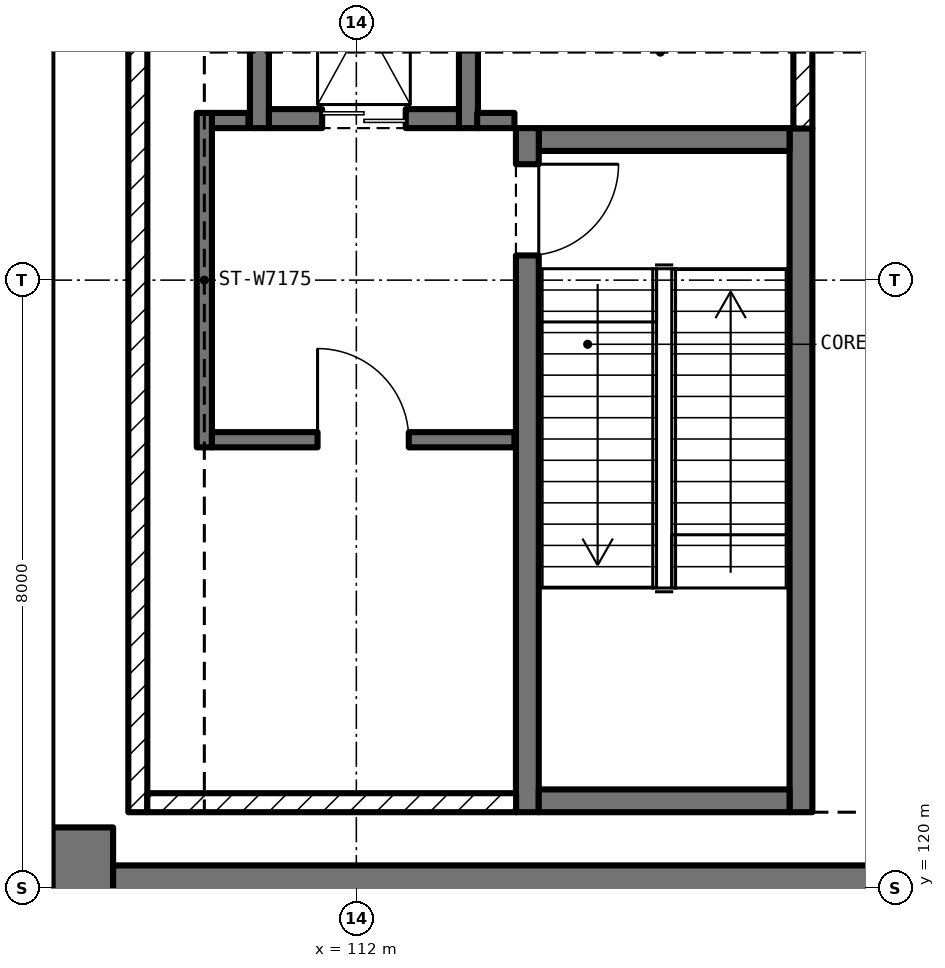
"""IFC4 building model, lengths in metres.
Left out: names, types, materials, properties, quantities, classifications, styles, units other than length and angle.
Written with IfcOpenShell. Run it as: python <this file> out.ifc"""

import sys

from ifc_helpers import new_model, si_unit, direction, frame, frame_2d, origin, place, context, subcontext, project, spatial, rectangle, extrude, element, fill, save


model = new_model("IFC4")
c1 = context("Model", 3, precision=1e-05, world=origin(), true_north=direction((0.0, 1.0)))
c2 = subcontext(c1, "Body", "Model", "MODEL_VIEW")
j1 = project(units=[si_unit("LENGTHUNIT", "METRE"), si_unit("PLANEANGLEUNIT", "RADIAN")], contexts=[c1])
p1 = place(None, origin())
s1 = spatial("IfcSite", under=j1, at=p1, CompositionType="ELEMENT")
p2 = place(p1, origin())
s2 = spatial("IfcBuilding", under=s1, at=p2, CompositionType="ELEMENT")
p3 = place(p2, frame((0.0, 0.0, 6.0)))
s3 = spatial("IfcBuildingStorey", under=s2, at=p3, CompositionType="ELEMENT", Elevation=6.0)
p4 = place(p3, frame((108.4, 116.0, 0.0), z_axis=(0.0, 0.0, 1.0), x_axis=(0.0, 1.0, 0.0)))
e1 = element("IfcWall", 1, at=p4, inside=s3, PredefinedType="SHEAR", context=c2, shape_type="SweptSolid", body=[
    extrude(rectangle(XDim=4.8, YDim=0.8, at=frame_2d((2.4, 0.0))), origin(), (0.0, 0.0, 1.0), 5.5),
])
p5 = place(p3, frame((108.8, 120.0, 0.0), z_axis=(0.0, 0.0, 1.0), x_axis=(1.0, 0.0, 0.0)))
e2 = element("IfcWall", 2, at=p5, inside=s3, PredefinedType="SHEAR", context=c2, shape_type="SweptSolid", body=[
    extrude(rectangle(XDim=22.6, YDim=0.6, at=frame_2d((11.3, 0.0))), origin(), (0.0, 0.0, 1.0), 5.5),
])
p6 = place(p3, frame((117.85, 121.0, 0.0), z_axis=(0.0, 0.0, 1.0), x_axis=(0.0, 1.0, 0.0)))
e3 = element("IfcWall", 3, at=p6, inside=s3, PredefinedType="SOLIDWALL", context=c2, shape_type="SweptSolid", body=[
    extrude(rectangle(XDim=9.0, YDim=0.3, at=frame_2d((4.5, 0.0))), origin(), (0.0, 0.0, 1.0), 5.5),
])
p7 = place(p3, frame((117.7, 129.85, 0.0), z_axis=(0.0, 0.0, 1.0), x_axis=(-1.0, 0.0, 0.0)))
e4 = element("IfcWall", 4, at=p7, inside=s3, PredefinedType="SOLIDWALL", context=c2, shape_type="SweptSolid", body=[
    extrude(rectangle(XDim=3.3, YDim=0.3, at=frame_2d((1.65, 0.0))), origin(), (0.0, 0.0, 1.0), 5.5),
])
p8 = place(p3, frame((114.25, 130.0, 0.0), z_axis=(0.0, 0.0, 1.0), x_axis=(0.0, -1.0, 0.0)))
e5 = element("IfcWall", 5, at=p8, inside=s3, PredefinedType="SOLIDWALL", context=c2, shape_type="SweptSolid", body=[
    extrude(rectangle(XDim=9.0, YDim=0.3, at=frame_2d((4.5, 0.0))), origin(), (0.0, 0.0, 1.0), 5.5),
])
p9 = place(p8, frame((0.475, 0.0, 0.0)))
e6 = element("IfcOpeningElement", 6, at=p9, cuts=e5, PredefinedType="OPENING", context=c2, shape_type="SweptSolid", body=[
    extrude(rectangle(XDim=1.2, YDim=2.1, at=frame_2d((0.6, 1.05))), frame((0.0, 0.162, 0.0), z_axis=(0.0, -1.0, 0.0), x_axis=(1.0, 0.0, 0.0)), (0.0, 0.0, 1.0), 0.324),
])
p10 = place(p3, frame((114.4, 121.15, 0.0), z_axis=(0.0, 0.0, 1.0), x_axis=(1.0, 0.0, 0.0)))
e7 = element("IfcWall", 7, at=p10, inside=s3, PredefinedType="SOLIDWALL", context=c2, shape_type="SweptSolid", body=[
    extrude(rectangle(XDim=3.3, YDim=0.3, at=frame_2d((1.65, 0.0))), origin(), (0.0, 0.0, 1.0), 5.5),
])
for number, where, z_axis, x_axis in (
    (8, (113.475, 130.0, 0.0), (0.0, 0.0, 1.0), (0.0, 1.0, 0.0)),
    (9, (110.725, 134.0, 0.0), (0.0, 0.0, 1.0), (0.0, -1.0, 0.0)),
):
    element("IfcWall", number, at=place(p3, frame(where, z_axis=z_axis, x_axis=x_axis)), inside=s3, PredefinedType="SOLIDWALL", context=c2, shape_type="SweptSolid", body=[
        extrude(rectangle(XDim=4.0, YDim=0.25, at=frame_2d((2.0, 0.0))), origin(), (0.0, 0.0, 1.0), 5.5),
    ])
p11 = place(p3, frame((110.85, 130.125, 0.0), z_axis=(0.0, 0.0, 1.0), x_axis=(1.0, 0.0, 0.0)))
e10 = element("IfcWall", 10, at=p11, inside=s3, PredefinedType="SOLIDWALL", context=c2, shape_type="SweptSolid", body=[
    extrude(rectangle(XDim=2.5, YDim=0.25, at=frame_2d((1.25, 0.0))), origin(), (0.0, 0.0, 1.0), 5.5),
])
p12 = place(p11, frame((0.7, 0.0, 0.0)))
e11 = element("IfcOpeningElement", 11, at=p12, cuts=e10, PredefinedType="OPENING", context=c2, shape_type="SweptSolid", body=[
    extrude(rectangle(XDim=1.1, YDim=2.1, at=frame_2d((0.55, 1.05))), frame((0.0, 0.137, 0.0), z_axis=(0.0, -1.0, 0.0), x_axis=(1.0, 0.0, 0.0)), (0.0, 0.0, 1.0), 0.274),
])
p13 = place(p3, frame((114.08, 130.1, 0.0), z_axis=(0.0, 0.0, 1.0), x_axis=(-1.0, 0.0, 0.0)))
e12 = element("IfcWall", 12, at=p13, inside=s3, PredefinedType="PARTITIONING", context=c2, shape_type="SweptSolid", body=[
    extrude(rectangle(XDim=0.49, YDim=0.2, at=frame_2d((0.245, 0.0))), origin(), (0.0, 0.0, 1.0), 5.28),
])
p14 = place(p3, frame((110.58, 130.1, 0.0), z_axis=(0.0, 0.0, 1.0), x_axis=(-1.0, 0.0, 0.0)))
e13 = element("IfcWall", 13, at=p14, inside=s3, PredefinedType="PARTITIONING", context=c2, shape_type="SweptSolid", body=[
    extrude(rectangle(XDim=0.48, YDim=0.2, at=frame_2d((0.24, 0.0))), origin(), (0.0, 0.0, 1.0), 5.28),
])
p15 = place(p3, frame((110.0, 130.2, 0.0), z_axis=(0.0, 0.0, 1.0), x_axis=(0.0, -1.0, 0.0)))
e14 = element("IfcWall", 14, at=p15, inside=s3, PredefinedType="PARTITIONING", context=c2, shape_type="SweptSolid", body=[
    extrude(rectangle(XDim=4.4, YDim=0.2, at=frame_2d((2.2, 0.0))), origin(), (0.0, 0.0, 1.0), 5.28),
])
p16 = place(p3, frame((110.1, 125.9, 0.0), z_axis=(0.0, 0.0, 1.0), x_axis=(1.0, 0.0, 0.0)))
e15 = element("IfcWall", 15, at=p16, inside=s3, PredefinedType="PARTITIONING", context=c2, shape_type="SweptSolid", body=[
    extrude(rectangle(XDim=3.98, YDim=0.2, at=frame_2d((1.99, 0.0))), origin(), (0.0, 0.0, 1.0), 5.28),
])
p17 = place(p16, frame((1.39, 0.0, 0.0)))
e16 = element("IfcOpeningElement", 16, at=p17, cuts=e15, PredefinedType="OPENING", context=c2, shape_type="SweptSolid", body=[
    extrude(rectangle(XDim=1.2, YDim=2.1, at=frame_2d((0.6, 1.05))), frame((0.0, 0.112, 0.0), z_axis=(0.0, -1.0, 0.0), x_axis=(1.0, 0.0, 0.0)), (0.0, 0.0, 1.0), 0.224),
])
p18 = place(p3, frame((117.875, 129.995, 0.0), z_axis=(0.0, 0.0, 1.0), x_axis=(0.0, 1.0, 0.0)))
e17 = element("IfcWall", 17, at=p18, inside=s3, PredefinedType="SOLIDWALL", context=c2, shape_type="SweptSolid", body=[
    extrude(rectangle(XDim=5.005, YDim=0.25, at=frame_2d((2.502, 0.0))), origin(), (0.0, 0.0, 1.0), 5.28),
])
p19 = place(p18, frame((1.43, 0.0, 2.6)))
e18 = element("IfcOpeningElement", 18, at=p19, cuts=e17, PredefinedType="OPENING", context=c2, shape_type="SweptSolid", body=[
    extrude(rectangle(XDim=2.4, YDim=1.2, at=frame_2d((1.2, 0.6))), frame((0.0, 0.137, 0.0), z_axis=(0.0, -1.0, 0.0), x_axis=(1.0, 0.0, 0.0)), (0.0, 0.0, 1.0), 0.274),
])
p20 = place(p3, frame((109.125, 134.75, 0.0), z_axis=(0.0, 0.0, 1.0), x_axis=(0.0, -1.0, 0.0)))
e19 = element("IfcWall", 19, at=p20, inside=s3, PredefinedType="SOLIDWALL", context=c2, shape_type="SweptSolid", body=[
    extrude(rectangle(XDim=13.75, YDim=0.25, at=frame_2d((6.875, 0.0))), origin(), (0.0, 0.0, 1.0), 5.28),
])
p21 = place(p3, frame((109.25, 121.125, 0.0), z_axis=(0.0, 0.0, 1.0), x_axis=(1.0, 0.0, 0.0)))
e20 = element("IfcWall", 20, at=p21, inside=s3, PredefinedType="SOLIDWALL", context=c2, shape_type="SweptSolid", body=[
    extrude(rectangle(XDim=4.852, YDim=0.25, at=frame_2d((2.426, 0.0))), origin(), (0.0, 0.0, 1.0), 5.28),
])
p22 = place(p9, origin())
e21 = element("IfcDoor", 21, at=p22, inside=s3, OperationType="SINGLE_SWING_LEFT", PredefinedType="DOOR", context=c2, shape_type="SweptSolid", body=[
    extrude(rectangle(XDim=1.2, YDim=2.1, at=frame_2d((0.6, 1.05))), frame((0.0, 0.025, 0.0), z_axis=(0.0, -1.0, 0.0), x_axis=(1.0, 0.0, 0.0)), (0.0, 0.0, 1.0), 0.05),
])
fill(e6, e21)
p23 = place(p12, origin())
e22 = element("IfcDoor", 22, at=p23, inside=s3, OperationType="DOUBLE_DOOR_SLIDING", PredefinedType="DOOR", context=c2, shape_type="SweptSolid", body=[
    extrude(rectangle(XDim=1.1, YDim=2.1, at=frame_2d((0.55, 1.05))), frame((0.0, 0.025, 0.0), z_axis=(0.0, -1.0, 0.0), x_axis=(1.0, 0.0, 0.0)), (0.0, 0.0, 1.0), 0.05),
])
fill(e11, e22)
p24 = place(p17, origin())
e23 = element("IfcDoor", 23, at=p24, inside=s3, OperationType="SINGLE_SWING_LEFT", PredefinedType="DOOR", context=c2, shape_type="SweptSolid", body=[
    extrude(rectangle(XDim=1.2, YDim=2.1, at=frame_2d((0.6, 1.05))), frame((0.0, 0.025, 0.0), z_axis=(0.0, -1.0, 0.0), x_axis=(1.0, 0.0, 0.0)), (0.0, 0.0, 1.0), 0.05),
])
fill(e16, e23)
save(model, sys.argv[1])
